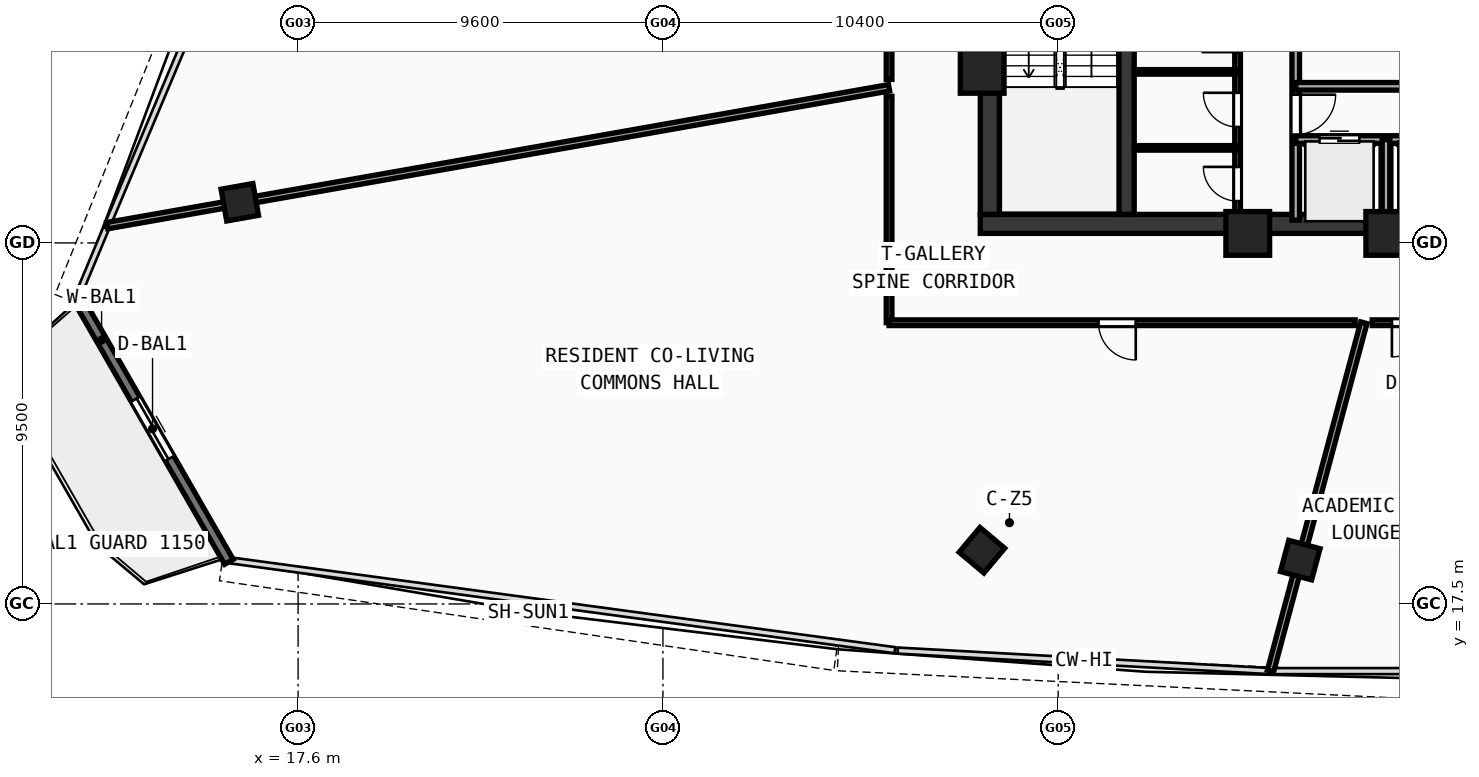
"""IFC4 building model, lengths in metres.
Left out: names, types, materials, properties, quantities, classifications, styles, units other than length and angle.
Written with IfcOpenShell. Run it as: python <this file> out.ifc"""

import sys

from ifc_helpers import new_model, si_unit, direction, frame, frame_2d, origin, origin_with_axes, origin_2d, place, context, subcontext, project, spatial, rectangle, hollow_rectangle, extrude, source, transform, mapped, element, fill, save


model = new_model("IFC4")
c1 = context("Model", 3, precision=1e-05, world=origin(), true_north=direction((0.0, 1.0)))
c2 = subcontext(c1, "Body", "Model", "MODEL_VIEW")
j1 = project(units=[si_unit("LENGTHUNIT", "METRE"), si_unit("PLANEANGLEUNIT", "RADIAN")], contexts=[c1])
p1 = place(None, origin())
s1 = spatial("IfcSite", under=j1, at=p1, CompositionType="ELEMENT")
p2 = place(p1, origin())
s2 = spatial("IfcBuilding", under=s1, at=p2, CompositionType="ELEMENT")
p3 = place(p2, frame((0.0, 0.0, 233.34)))
s3 = spatial("IfcBuildingStorey", under=s2, at=p3, CompositionType="ELEMENT", Elevation=233.34)
p4 = place(p3, frame((35.55, 27.5, 0.0), z_axis=(0.0, 0.0, 1.0), x_axis=(1.0, 0.0, 0.0)))
e1 = element("IfcWall", 1, at=p4, inside=s3, PredefinedType="SHEAR", context=c2, shape_type="SweptSolid", body=[
    extrude(rectangle(XDim=24.9, YDim=0.5, at=frame_2d((12.45, 0.0))), origin(), (0.0, 0.0, 1.0), 3.47),
])
p5 = place(p3, frame((35.8, 27.75, 0.0), z_axis=(0.0, 0.0, 1.0), x_axis=(0.0, 1.0, 0.0)))
e2 = element("IfcWall", 2, at=p5, inside=s3, PredefinedType="SHEAR", context=c2, shape_type="SweptSolid", body=[
    extrude(rectangle(XDim=12.2, YDim=0.5, at=frame_2d((6.1, 0.0))), origin(), (0.0, 0.0, 1.0), 3.47),
])
p6 = place(p3, frame((39.4, 27.75, 0.0), z_axis=(0.0, 0.0, 1.0), x_axis=(0.0, 1.0, 0.0)))
e3 = element("IfcWall", 3, at=p6, inside=s3, PredefinedType="SHEAR", context=c2, shape_type="SweptSolid", body=[
    extrude(rectangle(XDim=12.2, YDim=0.4, at=frame_2d((6.1, 0.0))), origin(), (0.0, 0.0, 1.0), 3.47),
])
p7 = place(p6, frame((10.0, 0.0, 0.0)))
e4 = element("IfcOpeningElement", 4, at=p7, cuts=e3, PredefinedType="OPENING", context=c2, shape_type="SweptSolid", body=[
    extrude(rectangle(XDim=1.1, YDim=2.1, at=frame_2d((0.55, 1.05))), frame((0.0, 0.21, 0.0), z_axis=(0.0, -1.0, 0.0), x_axis=(1.0, 0.0, 0.0)), (0.0, 0.0, 1.0), 0.42),
])
m1 = source(origin(), c2, "Body", "SweptSolid", [
    extrude(hollow_rectangle(XDim=1.15, YDim=1.15, WallThickness=0.048, at=origin_2d()), origin(), (0.0, 0.0, 1.0), 3.73),
])
for number, where, z_axis, x_axis in (
    (5, (42.588, 27.25, -0.26), (0.0, 0.0, 1.0), (1.0, 0.0, 0.0)),
    (6, (46.272, 27.25, -0.26), (0.0, 0.0, 1.0), (1.0, 0.0, 0.0)),
    (7, (35.6, 31.513, -0.26), (0.0, 0.0, 1.0), (1.0, 0.0, 0.0)),
):
    element("IfcColumn", number, at=place(p3, frame(where, z_axis=z_axis, x_axis=x_axis)), inside=s3, PredefinedType="COLUMN", context=c2, shape_type="MappedRepresentation", body=[
        mapped(m1, transform((0.0, 0.0, 0.0), scale=1.0)),
    ])
m2 = source(origin(), c2, "Body", "SweptSolid", [
    extrude(hollow_rectangle(XDim=0.85, YDim=0.85, WallThickness=0.034, at=origin_2d()), origin(), (0.0, 0.0, 1.0), 3.73),
])
for number, where, z_axis, x_axis in (
    (8, (35.593, 18.914, -0.26), (0.0, 0.0, 1.0), (0.766, -0.643, 0.0)),
    (9, (43.969, 18.654, -0.26), (0.0, 0.0, 1.0), (0.966, -0.259, 0.0)),
    (10, (16.066, 28.069, -0.26), (0.0, 0.0, 1.0), (0.174, -0.985, 0.0)),
):
    element("IfcColumn", number, at=place(p3, frame(where, z_axis=z_axis, x_axis=x_axis)), inside=s3, PredefinedType="COLUMN", context=c2, shape_type="MappedRepresentation", body=[
        mapped(m2, transform((0.0, 0.0, 0.0), scale=1.0)),
    ])
p8 = place(p3, frame((11.76, 25.609, 0.0), z_axis=(0.0, 0.0, 1.0), x_axis=(0.49791595327, -0.867225289921, 0.0)))
e11 = element("IfcWall", 11, at=p8, inside=s3, PredefinedType="STANDARD", context=c2, shape_type="SweptSolid", body=[
    extrude(rectangle(XDim=8.074, YDim=0.26, at=frame_2d((4.037, 0.0))), origin(), (0.0, 0.0, 1.0), 3.47),
])
p9 = place(p8, frame((3.137, 0.0, 0.0)))
e12 = element("IfcOpeningElement", 12, at=p9, cuts=e11, PredefinedType="OPENING", context=c2, shape_type="SweptSolid", body=[
    extrude(rectangle(XDim=1.8, YDim=2.15, at=frame_2d((0.9, 1.075))), frame((0.0, 0.14, 0.0), z_axis=(0.0, -1.0, 0.0), x_axis=(1.0, 0.0, 0.0)), (0.0, 0.0, 1.0), 0.28),
])
p10 = place(p3, frame((43.85, 27.6, 0.0), z_axis=(0.0, 0.0, 1.0), x_axis=(0.0, 1.0, 0.0)))
e13 = element("IfcWall", 13, at=p10, inside=s3, PredefinedType="SOLIDWALL", context=c2, shape_type="SweptSolid", body=[
    extrude(rectangle(XDim=6.22, YDim=0.2, at=frame_2d((3.11, 0.0))), origin(), (0.0, 0.0, 1.0), 3.47),
])
p11 = place(p10, frame((2.25, 0.0, 0.0)))
e14 = element("IfcOpeningElement", 14, at=p11, cuts=e13, PredefinedType="OPENING", context=c2, shape_type="SweptSolid", body=[
    extrude(rectangle(XDim=1.05, YDim=2.1, at=frame_2d((0.525, 1.05))), frame((0.0, 0.11, 0.0), z_axis=(0.0, -1.0, 0.0), x_axis=(1.0, 0.0, 0.0)), (0.0, 0.0, 1.0), 0.22),
])
p12 = place(p3, frame((43.85, 29.72, 0.0), z_axis=(0.0, 0.0, 1.0), x_axis=(1.0, 0.0, 0.0)))
e15 = element("IfcWall", 15, at=p12, inside=s3, PredefinedType="SOLIDWALL", context=c2, shape_type="SweptSolid", body=[
    extrude(rectangle(XDim=7.2, YDim=0.2, at=frame_2d((3.6, 0.0))), origin(), (0.0, 0.0, 1.0), 3.47),
])
p13 = place(p12, frame((0.625, 0.0, 0.0)))
e16 = element("IfcOpeningElement", 16, at=p13, cuts=e15, PredefinedType="OPENING", context=c2, shape_type="SweptSolid", body=[
    extrude(rectangle(XDim=1.05, YDim=2.1, at=frame_2d((0.525, 1.05))), frame((0.0, 0.11, 0.0), z_axis=(0.0, -1.0, 0.0), x_axis=(1.0, 0.0, 0.0)), (0.0, 0.0, 1.0), 0.22),
])
p14 = place(p12, frame((3.075, 0.0, 0.0)))
e17 = element("IfcOpeningElement", 17, at=p14, cuts=e15, PredefinedType="OPENING", context=c2, shape_type="SweptSolid", body=[
    extrude(rectangle(XDim=1.05, YDim=2.1, at=frame_2d((0.525, 1.05))), frame((0.0, 0.11, 0.0), z_axis=(0.0, -1.0, 0.0), x_axis=(1.0, 0.0, 0.0)), (0.0, 0.0, 1.0), 0.22),
])
p15 = place(p12, frame((5.525, 0.0, 0.0)))
e18 = element("IfcOpeningElement", 18, at=p15, cuts=e15, PredefinedType="OPENING", context=c2, shape_type="SweptSolid", body=[
    extrude(rectangle(XDim=1.05, YDim=2.1, at=frame_2d((0.525, 1.05))), frame((0.0, 0.11, 0.0), z_axis=(0.0, -1.0, 0.0), x_axis=(1.0, 0.0, 0.0)), (0.0, 0.0, 1.0), 0.22),
])
p16 = place(p3, frame((43.85, 31.12, 0.0), z_axis=(0.0, 0.0, 1.0), x_axis=(1.0, 0.0, 0.0)))
e19 = element("IfcWall", 19, at=p16, inside=s3, PredefinedType="SOLIDWALL", context=c2, shape_type="SweptSolid", body=[
    extrude(rectangle(XDim=9.83, YDim=0.2, at=frame_2d((4.915, 0.0))), origin(), (0.0, 0.0, 1.0), 3.47),
])
p17 = place(p3, frame((46.225, 27.6, 0.0), z_axis=(0.0, 0.0, 1.0), x_axis=(0.0, 1.0, 0.0)))
e20 = element("IfcWall", 20, at=p17, inside=s3, PredefinedType="SOLIDWALL", context=c2, shape_type="SweptSolid", body=[
    extrude(rectangle(XDim=2.12, YDim=0.2, at=frame_2d((1.06, 0.0))), origin(), (0.0, 0.0, 1.0), 3.47),
])
p18 = place(p3, frame((42.32, 27.6, 0.0), z_axis=(0.0, 0.0, 1.0), x_axis=(0.0, 1.0, 0.0)))
e21 = element("IfcWall", 21, at=p18, inside=s3, PredefinedType="PARTITIONING", context=c2, shape_type="SweptSolid", body=[
    extrude(rectangle(XDim=5.9, YDim=0.15, at=frame_2d((2.95, 0.0))), origin(), (0.0, 0.0, 1.0), 3.47),
])
p19 = place(p18, frame((0.5, 0.0, 0.0)))
e22 = element("IfcOpeningElement", 22, at=p19, cuts=e21, PredefinedType="OPENING", context=c2, shape_type="SweptSolid", body=[
    extrude(rectangle(XDim=0.9, YDim=2.1, at=frame_2d((0.45, 1.05))), frame((0.0, 0.085, 0.0), z_axis=(0.0, -1.0, 0.0), x_axis=(1.0, 0.0, 0.0)), (0.0, 0.0, 1.0), 0.17),
])
p20 = place(p18, frame((2.45, 0.0, 0.0)))
e23 = element("IfcOpeningElement", 23, at=p20, cuts=e21, PredefinedType="OPENING", context=c2, shape_type="SweptSolid", body=[
    extrude(rectangle(XDim=0.9, YDim=2.1, at=frame_2d((0.45, 1.05))), frame((0.0, 0.085, 0.0), z_axis=(0.0, -1.0, 0.0), x_axis=(1.0, 0.0, 0.0)), (0.0, 0.0, 1.0), 0.17),
])
p21 = place(p18, frame((4.42, 0.0, 0.0)))
e24 = element("IfcOpeningElement", 24, at=p21, cuts=e21, PredefinedType="OPENING", context=c2, shape_type="SweptSolid", body=[
    extrude(rectangle(XDim=0.94, YDim=2.1, at=frame_2d((0.47, 1.05))), frame((0.0, 0.085, 0.0), z_axis=(0.0, -1.0, 0.0), x_axis=(1.0, 0.0, 0.0)), (0.0, 0.0, 1.0), 0.17),
])
for number, where, z_axis, x_axis in (
    (25, (39.6, 29.5, 0.0), (0.0, 0.0, 1.0), (1.0, 0.0, 0.0)),
    (26, (39.6, 31.5, 0.0), (0.0, 0.0, 1.0), (1.0, 0.0, 0.0)),
):
    element("IfcWall", number, at=place(p3, frame(where, z_axis=z_axis, x_axis=x_axis)), inside=s3, PredefinedType="PARTITIONING", context=c2, shape_type="SweptSolid", body=[
        extrude(rectangle(XDim=2.72, YDim=0.12, at=frame_2d((1.36, 0.0))), origin(), (0.0, 0.0, 1.0), 3.47),
    ])
p22 = place(p3, frame((33.15, 31.082, 0.0), z_axis=(0.0, 0.0, 1.0), x_axis=(-0.984808138799, -0.17364598975, 0.0)))
e27 = element("IfcWall", 27, at=p22, inside=s3, PredefinedType="PARTITIONING", context=c2, shape_type="SweptSolid", body=[
    extrude(rectangle(XDim=20.89, YDim=0.17, at=frame_2d((10.445, 0.0))), origin(), (0.0, 0.0, 1.0), 2.82),
])
p23 = place(p3, frame((45.642, 24.9, 0.0), z_axis=(0.0, 0.0, 1.0), x_axis=(-0.258832957733, -0.965922098304, 0.0)))
e28 = element("IfcWall", 28, at=p23, inside=s3, PredefinedType="PARTITIONING", context=c2, shape_type="SweptSolid", body=[
    extrude(rectangle(XDim=9.49, YDim=0.17, at=frame_2d((4.745, 0.0))), origin(), (0.0, 0.0, 1.0), 2.82),
])
p24 = place(p3, frame((33.15, 24.9, 0.0), z_axis=(0.0, 0.0, 1.0), x_axis=(0.0, 1.0, 0.0)))
e29 = element("IfcWall", 29, at=p24, inside=s3, PredefinedType="PARTITIONING", context=c2, shape_type="SweptSolid", body=[
    extrude(rectangle(XDim=5.958, YDim=0.15, at=frame_2d((2.979, 0.0))), origin(), (0.0, 0.0, 1.0), 3.12),
])
p25 = place(p3, frame((33.15, 31.301, 0.0), z_axis=(0.0, 0.0, 1.0), x_axis=(0.0, 1.0, 0.0)))
e30 = element("IfcWall", 30, at=p25, inside=s3, PredefinedType="PARTITIONING", context=c2, shape_type="SweptSolid", body=[
    extrude(rectangle(XDim=7.004, YDim=0.15, at=frame_2d((3.502, 0.0))), origin(), (0.0, 0.0, 1.0), 3.47),
])
p26 = place(p25, frame((3.027, 0.0, 0.0)))
e31 = element("IfcOpeningElement", 31, at=p26, cuts=e30, PredefinedType="OPENING", context=c2, shape_type="SweptSolid", body=[
    extrude(rectangle(XDim=0.98, YDim=2.12, at=frame_2d((0.49, 1.06))), frame((0.0, 0.085, 0.0), z_axis=(0.0, -1.0, 0.0), x_axis=(1.0, 0.0, 0.0)), (0.0, 0.0, 1.0), 0.17),
])
p27 = place(p3, frame((47.78, 24.9, 0.0), z_axis=(0.0, 0.0, 1.0), x_axis=(-1.0, 0.0, 0.0)))
e32 = element("IfcWall", 32, at=p27, inside=s3, PredefinedType="PARTITIONING", context=c2, shape_type="SweptSolid", body=[
    extrude(rectangle(XDim=1.918, YDim=0.15, at=frame_2d((0.959, 0.0))), origin(), (0.0, 0.0, 1.0), 3.47),
])
p28 = place(p27, frame((0.499, 0.0, 0.0)))
e33 = element("IfcOpeningElement", 33, at=p28, cuts=e32, PredefinedType="OPENING", context=c2, shape_type="SweptSolid", body=[
    extrude(rectangle(XDim=0.9, YDim=2.08, at=frame_2d((0.45, 1.04))), frame((0.0, 0.085, 0.0), z_axis=(0.0, -1.0, 0.0), x_axis=(1.0, 0.0, 0.0)), (0.0, 0.0, 1.0), 0.17),
])
p29 = place(p3, frame((45.414, 24.9, 0.0), z_axis=(0.0, 0.0, 1.0), x_axis=(-1.0, 0.0, 0.0)))
e34 = element("IfcWall", 34, at=p29, inside=s3, PredefinedType="PARTITIONING", context=c2, shape_type="SweptSolid", body=[
    extrude(rectangle(XDim=12.264, YDim=0.15, at=frame_2d((6.132, 0.0))), origin(), (0.0, 0.0, 1.0), 2.82),
])
p30 = place(p29, frame((5.773, 0.0, 0.0)))
e35 = element("IfcOpeningElement", 35, at=p30, cuts=e34, PredefinedType="OPENING", context=c2, shape_type="SweptSolid", body=[
    extrude(rectangle(XDim=0.98, YDim=2.12, at=frame_2d((0.49, 1.06))), frame((0.0, 0.085, 0.0), z_axis=(0.0, -1.0, 0.0), x_axis=(1.0, 0.0, 0.0)), (0.0, 0.0, 1.0), 0.17),
])
m3 = source(origin(), c2, "Body", "SweptSolid", [
    extrude(rectangle(XDim=1.8, YDim=2.15, at=frame_2d((0.9, 1.075))), frame((0.0, 0.025, 0.0), z_axis=(0.0, -1.0, 0.0), x_axis=(1.0, 0.0, 0.0)), (0.0, 0.0, 1.0), 0.05),
])
p31 = place(p9, origin_with_axes())
e36 = element("IfcDoor", 36, at=p31, inside=s3, OperationType="DOUBLE_DOOR_SLIDING", PredefinedType="DOOR", context=c2, shape_type="MappedRepresentation", body=[
    mapped(m3, transform((0.0, 0.0, 0.0), scale=1.0)),
])
fill(e12, e36)
m4 = source(origin(), c2, "Body", "SweptSolid", [
    extrude(rectangle(XDim=1.05, YDim=2.1, at=frame_2d((0.525, 1.05))), frame((0.0, 0.025, 0.0), z_axis=(0.0, -1.0, 0.0), x_axis=(1.0, 0.0, 0.0)), (0.0, 0.0, 1.0), 0.05),
])
p32 = place(p11, frame((1.05, 0.0, 0.0), z_axis=(0.0, 0.0, 1.0), x_axis=(-1.0, 0.0, 0.0)))
e37 = element("IfcDoor", 37, at=p32, inside=s3, OperationType="SINGLE_SWING_LEFT", PredefinedType="DOOR", context=c2, shape_type="MappedRepresentation", body=[
    mapped(m4, transform((0.0, 0.0, 0.0), scale=1.0)),
])
fill(e14, e37)
p33 = place(p13, origin_with_axes())
e38 = element("IfcDoor", 38, at=p33, inside=s3, OperationType="DOUBLE_DOOR_SLIDING", PredefinedType="DOOR", context=c2, shape_type="MappedRepresentation", body=[
    mapped(m4, transform((0.0, 0.0, 0.0), scale=1.0)),
])
fill(e16, e38)
m5 = source(origin(), c2, "Body", "SweptSolid", [
    extrude(rectangle(XDim=0.9, YDim=2.1, at=frame_2d((0.45, 1.05))), frame((0.0, 0.025, 0.0), z_axis=(0.0, -1.0, 0.0), x_axis=(1.0, 0.0, 0.0)), (0.0, 0.0, 1.0), 0.05),
])
p34 = place(p19, origin_with_axes())
e39 = element("IfcDoor", 39, at=p34, inside=s3, OperationType="SINGLE_SWING_RIGHT", PredefinedType="DOOR", context=c2, shape_type="MappedRepresentation", body=[
    mapped(m5, transform((0.0, 0.0, 0.0), scale=1.0)),
])
fill(e22, e39)
p35 = place(p20, origin_with_axes())
e40 = element("IfcDoor", 40, at=p35, inside=s3, OperationType="SINGLE_SWING_RIGHT", PredefinedType="DOOR", context=c2, shape_type="MappedRepresentation", body=[
    mapped(m5, transform((0.0, 0.0, 0.0), scale=1.0)),
])
fill(e23, e40)
m6 = source(origin(), c2, "Body", "SweptSolid", [
    extrude(rectangle(XDim=0.98, YDim=2.12, at=frame_2d((0.49, 1.06))), frame((0.0, 0.025, 0.0), z_axis=(0.0, -1.0, 0.0), x_axis=(1.0, 0.0, 0.0)), (0.0, 0.0, 1.0), 0.05),
])
p36 = place(p30, origin_with_axes())
e41 = element("IfcDoor", 41, at=p36, inside=s3, OperationType="SINGLE_SWING_LEFT", PredefinedType="DOOR", context=c2, shape_type="MappedRepresentation", body=[
    mapped(m6, transform((0.0, 0.0, 0.0), scale=1.0)),
])
fill(e35, e41)
m7 = source(origin(), c2, "Body", "SweptSolid", [
    extrude(rectangle(XDim=0.9, YDim=2.08, at=frame_2d((0.45, 1.04))), frame((0.0, 0.025, 0.0), z_axis=(0.0, -1.0, 0.0), x_axis=(1.0, 0.0, 0.0)), (0.0, 0.0, 1.0), 0.05),
])
p37 = place(p28, origin_with_axes())
e42 = element("IfcDoor", 42, at=p37, inside=s3, OperationType="SINGLE_SWING_RIGHT", PredefinedType="DOOR", context=c2, shape_type="MappedRepresentation", body=[
    mapped(m7, transform((0.0, 0.0, 0.0), scale=1.0)),
])
fill(e33, e42)
save(model, sys.argv[1])
